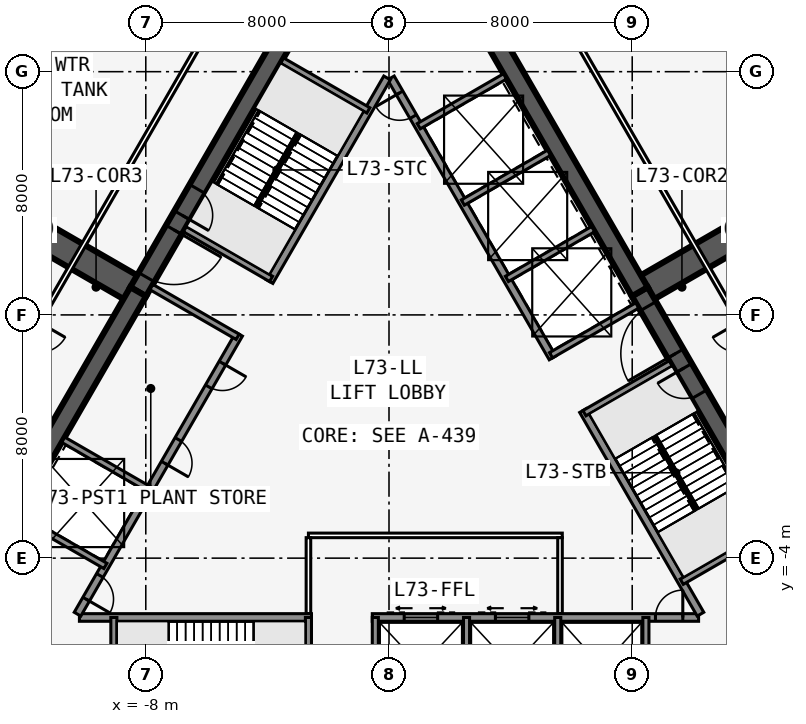
"""IFC4 building model, lengths in metres.
Left out: names, types, materials, properties, quantities, classifications, styles, units other than length and angle.
Written with IfcOpenShell. Run it as: python <this file> out.ifc"""

import sys

from ifc_helpers import new_model, si_unit, direction, frame, frame_2d, origin, place, context, subcontext, project, spatial, rectangle, extrude, element, fill, save


model = new_model("IFC4")
c1 = context("Model", 3, precision=1e-05, world=origin(), true_north=direction((0.0, 1.0)))
c2 = subcontext(c1, "Body", "Model", "MODEL_VIEW")
j1 = project(units=[si_unit("LENGTHUNIT", "METRE"), si_unit("PLANEANGLEUNIT", "RADIAN")], contexts=[c1])
p1 = place(None, origin())
s1 = spatial("IfcSite", under=j1, at=p1, CompositionType="ELEMENT")
p2 = place(p1, origin())
s2 = spatial("IfcBuilding", under=s1, at=p2, CompositionType="ELEMENT")
p3 = place(p2, frame((0.0, 0.0, 275.3)))
s3 = spatial("IfcBuildingStorey", under=s2, at=p3, CompositionType="ELEMENT", Elevation=275.3)
p4 = place(p3, frame((-10.183, -5.951, 0.0), z_axis=(0.0, 0.0, 1.0), x_axis=(1.0, 0.0, 0.0)))
e1 = element("IfcWall", 1, at=p4, inside=s3, PredefinedType="SOLIDWALL", context=c2, shape_type="SweptSolid", body=[
    extrude(rectangle(XDim=7.633, YDim=0.25, at=frame_2d((3.816, 0.0))), origin(), (0.0, 0.0, 1.0), 5.75),
])
p5 = place(p3, frame((-0.55, -5.951, 0.0), z_axis=(0.0, 0.0, 1.0), x_axis=(1.0, 0.0, 0.0)))
e2 = element("IfcWall", 2, at=p5, inside=s3, PredefinedType="SOLIDWALL", context=c2, shape_type="SweptSolid", body=[
    extrude(rectangle(XDim=10.733, YDim=0.25, at=frame_2d((5.366, 0.0))), origin(), (0.0, 0.0, 1.0), 5.75),
])
p6 = place(p5, frame((9.314, 0.0, 0.0)))
e3 = element("IfcOpeningElement", 3, at=p6, cuts=e2, PredefinedType="OPENING", context=c2, shape_type="SweptSolid", body=[
    extrude(rectangle(XDim=0.9, YDim=2.13, at=frame_2d((0.45, 1.065))), frame((0.0, 0.135, 0.0), z_axis=(0.0, -1.0, 0.0), x_axis=(1.0, 0.0, 0.0)), (0.0, 0.0, 1.0), 0.27),
])
p7 = place(p5, frame((1.05, 0.0, 0.0)))
e4 = element("IfcOpeningElement", 4, at=p7, cuts=e2, PredefinedType="OPENING", context=c2, shape_type="SweptSolid", body=[
    extrude(rectangle(XDim=1.1, YDim=2.13, at=frame_2d((0.55, 1.065))), frame((0.0, 0.135, 0.0), z_axis=(0.0, -1.0, 0.0), x_axis=(1.0, 0.0, 0.0)), (0.0, 0.0, 1.0), 0.27),
])
p8 = place(p5, frame((4.05, 0.0, 0.0)))
e5 = element("IfcOpeningElement", 5, at=p8, cuts=e2, PredefinedType="OPENING", context=c2, shape_type="SweptSolid", body=[
    extrude(rectangle(XDim=1.1, YDim=2.13, at=frame_2d((0.55, 1.065))), frame((0.0, 0.135, 0.0), z_axis=(0.0, -1.0, 0.0), x_axis=(1.0, 0.0, 0.0)), (0.0, 0.0, 1.0), 0.27),
])
p9 = place(p3, frame((-9.05, -5.951, 0.0), z_axis=(0.0, 0.0, 1.0), x_axis=(0.0, -1.0, 0.0)))
e6 = element("IfcWall", 6, at=p9, inside=s3, PredefinedType="SOLIDWALL", context=c2, shape_type="SweptSolid", body=[
    extrude(rectangle(XDim=3.275, YDim=0.2, at=frame_2d((1.637, 0.0))), origin(), (0.0, 0.0, 1.0), 5.75),
])
p10 = place(p3, frame((-2.65, -5.951, 0.0), z_axis=(0.0, 0.0, 1.0), x_axis=(0.0, -1.0, 0.0)))
e7 = element("IfcWall", 7, at=p10, inside=s3, PredefinedType="SOLIDWALL", context=c2, shape_type="SweptSolid", body=[
    extrude(rectangle(XDim=3.275, YDim=0.2, at=frame_2d((1.637, 0.0))), origin(), (0.0, 0.0, 1.0), 5.75),
])
p11 = place(p10, frame((1.675, 0.0, 0.0)))
e8 = element("IfcOpeningElement", 8, at=p11, cuts=e7, PredefinedType="OPENING", context=c2, shape_type="SweptSolid", body=[
    extrude(rectangle(XDim=1.0, YDim=2.13, at=frame_2d((0.5, 1.065))), frame((0.0, 0.11, 0.0), z_axis=(0.0, -1.0, 0.0), x_axis=(1.0, 0.0, 0.0)), (0.0, 0.0, 1.0), 0.22),
])
for number, where, z_axis, x_axis in (
    (9, (-0.45, -5.951, 0.0), (0.0, 0.0, 1.0), (0.0, -1.0, 0.0)),
    (10, (2.55, -5.951, 0.0), (0.0, 0.0, 1.0), (0.0, -1.0, 0.0)),
    (11, (5.55, -5.951, 0.0), (0.0, 0.0, 1.0), (0.0, -1.0, 0.0)),
    (12, (8.45, -5.951, 0.0), (0.0, 0.0, 1.0), (0.0, -1.0, 0.0)),
):
    element("IfcWall", number, at=place(p3, frame(where, z_axis=z_axis, x_axis=x_axis)), inside=s3, PredefinedType="SOLIDWALL", context=c2, shape_type="SweptSolid", body=[
        extrude(rectangle(XDim=3.275, YDim=0.2, at=frame_2d((1.637, 0.0))), origin(), (0.0, 0.0, 1.0), 5.75),
    ])
p12 = place(p3, frame((16.5, -9.526, 0.0), z_axis=(0.0, 0.0, 1.0), x_axis=(-0.499996545922, 0.866027397988, 0.0)))
e13 = element("IfcWall", 13, at=p12, inside=s3, PredefinedType="SHEAR", context=c2, shape_type="SweptSolid", body=[
    extrude(rectangle(XDim=16.5, YDim=0.6, at=frame_2d((8.25, 0.0))), origin(), (0.0, 0.0, 1.0), 6.0),
])
p13 = place(p12, frame((14.15, 0.0, 0.0)))
e14 = element("IfcOpeningElement", 14, at=p13, cuts=e13, PredefinedType="OPENING", context=c2, shape_type="SweptSolid", body=[
    extrude(rectangle(XDim=1.8, YDim=2.13, at=frame_2d((0.9, 1.065))), frame((0.0, 0.31, 0.0), z_axis=(0.0, -1.0, 0.0), x_axis=(1.0, 0.0, 0.0)), (0.0, 0.0, 1.0), 0.62),
])
p14 = place(p12, frame((12.6, 0.0, 0.0)))
e15 = element("IfcOpeningElement", 15, at=p14, cuts=e13, PredefinedType="OPENING", context=c2, shape_type="SweptSolid", body=[
    extrude(rectangle(XDim=1.0, YDim=2.13, at=frame_2d((0.5, 1.065))), frame((0.0, 0.31, 0.0), z_axis=(0.0, -1.0, 0.0), x_axis=(1.0, 0.0, 0.0)), (0.0, 0.0, 1.0), 0.62),
])
p15 = place(p3, frame((8.25, 4.763, 0.0), z_axis=(0.0, 0.0, 1.0), x_axis=(-0.500002952946, 0.866023698893, 0.0)))
e16 = element("IfcWall", 16, at=p15, inside=s3, PredefinedType="SHEAR", context=c2, shape_type="SweptSolid", body=[
    extrude(rectangle(XDim=16.5, YDim=0.6, at=frame_2d((8.25, 0.0))), origin(), (0.0, 0.0, 1.0), 6.0),
])
p16 = place(p3, frame((10.245, -5.843, 0.0), z_axis=(0.0, 0.0, 1.0), x_axis=(-0.499993009313, 0.866029439822, 0.0)))
e17 = element("IfcWall", 17, at=p16, inside=s3, PredefinedType="SOLIDWALL", context=c2, shape_type="SweptSolid", body=[
    extrude(rectangle(XDim=7.733, YDim=0.25, at=frame_2d((3.866, 0.0))), origin(), (0.0, 0.0, 1.0), 5.75),
])
p17 = place(p3, frame((5.379, 2.586, 0.0), z_axis=(0.0, 0.0, 1.0), x_axis=(-0.500001375892, 0.866024609411, 0.0)))
e18 = element("IfcWall", 18, at=p17, inside=s3, PredefinedType="SOLIDWALL", context=c2, shape_type="SweptSolid", body=[
    extrude(rectangle(XDim=10.633, YDim=0.25, at=frame_2d((5.316, 0.0))), origin(), (0.0, 0.0, 1.0), 5.75),
])
p18 = place(p17, frame((9.164, 0.0, 0.0)))
e19 = element("IfcOpeningElement", 19, at=p18, cuts=e18, PredefinedType="OPENING", context=c2, shape_type="SweptSolid", body=[
    extrude(rectangle(XDim=0.9, YDim=2.13, at=frame_2d((0.45, 1.065))), frame((0.0, 0.135, 0.0), z_axis=(0.0, -1.0, 0.0), x_axis=(1.0, 0.0, 0.0)), (0.0, 0.0, 1.0), 0.27),
])
p19 = place(p3, frame((9.629, -4.775, 0.0), z_axis=(0.0, 0.0, 1.0), x_axis=(0.865995643347, 0.500051543047, 0.0)))
e20 = element("IfcWall", 20, at=p19, inside=s3, PredefinedType="SOLIDWALL", context=c2, shape_type="SweptSolid", body=[
    extrude(rectangle(XDim=3.275, YDim=0.2, at=frame_2d((1.638, 0.0))), origin(), (0.0, 0.0, 1.0), 5.75),
])
for number, where, z_axis, x_axis in (
    (21, (6.429, 0.767, 0.0), (0.0, 0.0, 1.0), (0.866, 0.5, 0.0)),
    (22, (5.329, 2.673, 0.0), (0.0, 0.0, 1.0), (0.866, 0.5, 0.0)),
    (23, (3.879, 5.184, 0.0), (0.0, 0.0, 1.0), (0.866, 0.5, 0.0)),
    (24, (2.429, 7.696, 0.0), (0.0, 0.0, 1.0), (0.866, 0.5, 0.0)),
    (25, (0.979, 10.207, 0.0), (0.0, 0.0, 1.0), (0.866, 0.5, 0.0)),
):
    element("IfcWall", number, at=place(p3, frame(where, z_axis=z_axis, x_axis=x_axis)), inside=s3, PredefinedType="SOLIDWALL", context=c2, shape_type="SweptSolid", body=[
        extrude(rectangle(XDim=3.275, YDim=0.2, at=frame_2d((1.637, 0.0))), origin(), (0.0, 0.0, 1.0), 5.75),
    ])
p20 = place(p3, frame((0.0, 19.052, 0.0), z_axis=(0.0, 0.0, 1.0), x_axis=(-0.500002952946, -0.866023698893, 0.0)))
e26 = element("IfcWall", 26, at=p20, inside=s3, PredefinedType="SHEAR", context=c2, shape_type="SweptSolid", body=[
    extrude(rectangle(XDim=16.5, YDim=0.6, at=frame_2d((8.25, 0.0))), origin(), (0.0, 0.0, 1.0), 6.0),
])
p21 = place(p20, frame((14.15, 0.0, 0.0)))
e27 = element("IfcOpeningElement", 27, at=p21, cuts=e26, PredefinedType="OPENING", context=c2, shape_type="SweptSolid", body=[
    extrude(rectangle(XDim=1.8, YDim=2.13, at=frame_2d((0.9, 1.065))), frame((0.0, 0.31, 0.0), z_axis=(0.0, -1.0, 0.0), x_axis=(1.0, 0.0, 0.0)), (0.0, 0.0, 1.0), 0.62),
])
p22 = place(p20, frame((12.6, 0.0, 0.0)))
e28 = element("IfcOpeningElement", 28, at=p22, cuts=e26, PredefinedType="OPENING", context=c2, shape_type="SweptSolid", body=[
    extrude(rectangle(XDim=1.0, YDim=2.13, at=frame_2d((0.5, 1.065))), frame((0.0, 0.31, 0.0), z_axis=(0.0, -1.0, 0.0), x_axis=(1.0, 0.0, 0.0)), (0.0, 0.0, 1.0), 0.62),
])
p23 = place(p3, frame((-8.25, 4.763, 0.0), z_axis=(0.0, 0.0, 1.0), x_axis=(-0.499996545922, -0.866027397988, 0.0)))
e29 = element("IfcWall", 29, at=p23, inside=s3, PredefinedType="SHEAR", context=c2, shape_type="SweptSolid", body=[
    extrude(rectangle(XDim=16.5, YDim=0.6, at=frame_2d((8.25, 0.0))), origin(), (0.0, 0.0, 1.0), 6.0),
])
p24 = place(p3, frame((-0.062, 11.794, 0.0), z_axis=(0.0, 0.0, 1.0), x_axis=(-0.500006680225, -0.86602154692, 0.0)))
e30 = element("IfcWall", 30, at=p24, inside=s3, PredefinedType="SOLIDWALL", context=c2, shape_type="SweptSolid", body=[
    extrude(rectangle(XDim=7.733, YDim=0.25, at=frame_2d((3.866, 0.0))), origin(), (0.0, 0.0, 1.0), 5.75),
])
p25 = place(p3, frame((-4.929, 3.365, 0.0), z_axis=(0.0, 0.0, 1.0), x_axis=(-0.499991433582, -0.866030349552, 0.0)))
e31 = element("IfcWall", 31, at=p25, inside=s3, PredefinedType="SOLIDWALL", context=c2, shape_type="SweptSolid", body=[
    extrude(rectangle(XDim=10.633, YDim=0.25, at=frame_2d((5.316, 0.0))), origin(), (0.0, 0.0, 1.0), 5.75),
])
p26 = place(p25, frame((9.164, 0.0, 0.0)))
e32 = element("IfcOpeningElement", 32, at=p26, cuts=e31, PredefinedType="OPENING", context=c2, shape_type="SweptSolid", body=[
    extrude(rectangle(XDim=0.9, YDim=2.13, at=frame_2d((0.45, 1.065))), frame((0.0, 0.135, 0.0), z_axis=(0.0, -1.0, 0.0), x_axis=(1.0, 0.0, 0.0)), (0.0, 0.0, 1.0), 0.27),
])
p27 = place(p25, frame((1.1, 0.0, 0.0)))
e33 = element("IfcOpeningElement", 33, at=p27, cuts=e31, PredefinedType="OPENING", context=c2, shape_type="SweptSolid", body=[
    extrude(rectangle(XDim=0.9, YDim=2.13, at=frame_2d((0.45, 1.065))), frame((0.0, 0.135, 0.0), z_axis=(0.0, -1.0, 0.0), x_axis=(1.0, 0.0, 0.0)), (0.0, 0.0, 1.0), 0.27),
])
p28 = place(p25, frame((4.0, 0.0, 0.0)))
e34 = element("IfcOpeningElement", 34, at=p28, cuts=e31, PredefinedType="OPENING", context=c2, shape_type="SweptSolid", body=[
    extrude(rectangle(XDim=0.9, YDim=2.13, at=frame_2d((0.45, 1.065))), frame((0.0, 0.135, 0.0), z_axis=(0.0, -1.0, 0.0), x_axis=(1.0, 0.0, 0.0)), (0.0, 0.0, 1.0), 0.27),
])
for number, where, z_axis, x_axis in (
    (35, (-0.679, 10.727, 0.0), (0.0, 0.0, 1.0), (-0.866, 0.5, 0.0)),
    (36, (-3.879, 5.184, 0.0), (0.0, 0.0, 1.0), (-0.866, 0.5, 0.0)),
    (37, (-4.979, 3.279, 0.0), (0.0, 0.0, 1.0), (-0.866, 0.5, 0.0)),
    (38, (-7.879, -1.744, 0.0), (0.0, 0.0, 1.0), (-0.866, 0.5, 0.0)),
    (39, (-9.329, -4.256, 0.0), (0.0, 0.0, 1.0), (-0.866, 0.5, 0.0)),
):
    element("IfcWall", number, at=place(p3, frame(where, z_axis=z_axis, x_axis=x_axis)), inside=s3, PredefinedType="SOLIDWALL", context=c2, shape_type="SweptSolid", body=[
        extrude(rectangle(XDim=3.275, YDim=0.2, at=frame_2d((1.637, 0.0))), origin(), (0.0, 0.0, 1.0), 5.75),
    ])
for number, where, z_axis, x_axis in (
    (40, (8.25, 4.763, 0.0), (0.0, 0.0, 1.0), (0.866, 0.5, 0.0)),
    (41, (-8.25, 4.763, 0.0), (0.0, 0.0, 1.0), (-0.866, 0.5, 0.0)),
):
    element("IfcWall", number, at=place(p3, frame(where, z_axis=z_axis, x_axis=x_axis)), inside=s3, PredefinedType="SHEAR", context=c2, shape_type="SweptSolid", body=[
        extrude(rectangle(XDim=8.154, YDim=0.9, at=frame_2d((4.077, 0.0))), origin(), (0.0, 0.0, 1.0), 6.0),
    ])
p29 = place(p3, frame((20.177, -11.245, 0.0), z_axis=(0.0, 0.0, 1.0), x_axis=(-0.499998875317, 0.866026053119, 0.0)))
e42 = element("IfcWall", 42, at=p29, inside=s3, PredefinedType="PARTITIONING", context=c2, shape_type="SweptSolid", body=[
    extrude(rectangle(XDim=39.654, YDim=0.15, at=frame_2d((19.827, 0.0))), origin(), (0.0, 0.0, 1.0), 5.75),
])
p30 = place(p29, frame((6.563, 0.0, 0.0)))
e43 = element("IfcOpeningElement", 43, at=p30, cuts=e42, PredefinedType="OPENING", context=c2, shape_type="SweptSolid", body=[
    extrude(rectangle(XDim=1.0, YDim=2.13, at=frame_2d((0.5, 1.065))), frame((0.0, 0.085, 0.0), z_axis=(0.0, -1.0, 0.0), x_axis=(1.0, 0.0, 0.0)), (0.0, 0.0, 1.0), 0.17),
])
p31 = place(p29, frame((16.327, 0.0, 0.0)))
e44 = element("IfcOpeningElement", 44, at=p31, cuts=e42, PredefinedType="OPENING", context=c2, shape_type="SweptSolid", body=[
    extrude(rectangle(XDim=1.0, YDim=2.13, at=frame_2d((0.5, 1.065))), frame((0.0, 0.085, 0.0), z_axis=(0.0, -1.0, 0.0), x_axis=(1.0, 0.0, 0.0)), (0.0, 0.0, 1.0), 0.17),
])
p32 = place(p29, frame((29.091, 0.0, 0.0)))
e45 = element("IfcOpeningElement", 45, at=p32, cuts=e42, PredefinedType="OPENING", context=c2, shape_type="SweptSolid", body=[
    extrude(rectangle(XDim=1.0, YDim=2.13, at=frame_2d((0.5, 1.065))), frame((0.0, 0.085, 0.0), z_axis=(0.0, -1.0, 0.0), x_axis=(1.0, 0.0, 0.0)), (0.0, 0.0, 1.0), 0.17),
])
p33 = place(p3, frame((-0.35, 23.096, 0.0), z_axis=(0.0, 0.0, 1.0), x_axis=(-0.499998875317, -0.866026053119, 0.0)))
e46 = element("IfcWall", 46, at=p33, inside=s3, PredefinedType="PARTITIONING", context=c2, shape_type="SweptSolid", body=[
    extrude(rectangle(XDim=39.654, YDim=0.15, at=frame_2d((19.827, 0.0))), origin(), (0.0, 0.0, 1.0), 5.75),
])
p34 = place(p33, frame((9.563, 0.0, 0.0)))
e47 = element("IfcOpeningElement", 47, at=p34, cuts=e46, PredefinedType="OPENING", context=c2, shape_type="SweptSolid", body=[
    extrude(rectangle(XDim=1.0, YDim=2.13, at=frame_2d((0.5, 1.065))), frame((0.0, 0.085, 0.0), z_axis=(0.0, -1.0, 0.0), x_axis=(1.0, 0.0, 0.0)), (0.0, 0.0, 1.0), 0.17),
])
p35 = place(p33, frame((22.327, 0.0, 0.0)))
e48 = element("IfcOpeningElement", 48, at=p35, cuts=e46, PredefinedType="OPENING", context=c2, shape_type="SweptSolid", body=[
    extrude(rectangle(XDim=1.0, YDim=2.13, at=frame_2d((0.5, 1.065))), frame((0.0, 0.085, 0.0), z_axis=(0.0, -1.0, 0.0), x_axis=(1.0, 0.0, 0.0)), (0.0, 0.0, 1.0), 0.17),
])
p36 = place(p33, frame((32.091, 0.0, 0.0)))
e49 = element("IfcOpeningElement", 49, at=p36, cuts=e46, PredefinedType="OPENING", context=c2, shape_type="SweptSolid", body=[
    extrude(rectangle(XDim=1.0, YDim=2.13, at=frame_2d((0.5, 1.065))), frame((0.0, 0.085, 0.0), z_axis=(0.0, -1.0, 0.0), x_axis=(1.0, 0.0, 0.0)), (0.0, 0.0, 1.0), 0.17),
])
p37 = place(p3, frame((-2.65, -3.251, 0.0), z_axis=(0.0, 0.0, 1.0), x_axis=(1.0, 0.0, 0.0)))
e50 = element("IfcWall", 50, at=p37, inside=s3, PredefinedType="PARTITIONING", context=c2, shape_type="SweptSolid", body=[
    extrude(rectangle(XDim=8.35, YDim=0.15, at=frame_2d((4.175, 0.0))), origin(), (0.0, 0.0, 1.0), 5.75),
])
for number, where, z_axis, x_axis in (
    (51, (-2.65, -5.826, 0.0), (0.0, 0.0, 1.0), (0.0, 1.0, 0.0)),
    (52, (5.625, -5.826, 0.0), (0.0, 0.0, 1.0), (0.0, 1.0, 0.0)),
):
    element("IfcWall", number, at=place(p3, frame(where, z_axis=z_axis, x_axis=x_axis)), inside=s3, PredefinedType="PARTITIONING", context=c2, shape_type="SweptSolid", body=[
        extrude(rectangle(XDim=2.5, YDim=0.15, at=frame_2d((1.25, 0.0))), origin(), (0.0, 0.0, 1.0), 5.75),
    ])
for number, where, z_axis, x_axis in (
    (53, (10.135, -2.401, 0.0), (0.0, 0.0, 1.0), (-0.5, 0.866, 0.0)),
    (54, (-2.988, 9.978, 0.0), (0.0, 0.0, 1.0), (-0.5, -0.866, 0.0)),
):
    element("IfcWall", number, at=place(p3, frame(where, z_axis=z_axis, x_axis=x_axis)), inside=s3, PredefinedType="SOLIDWALL", context=c2, shape_type="SweptSolid", body=[
        extrude(rectangle(XDim=2.794, YDim=0.1, at=frame_2d((1.397, 0.0))), origin(), (0.0, 0.0, 1.0), 6.0),
    ])
p38 = place(p13, origin())
e55 = element("IfcDoor", 55, at=p38, inside=s3, OperationType="DOUBLE_DOOR_SINGLE_SWING", PredefinedType="DOOR", context=c2, shape_type="SweptSolid", body=[
    extrude(rectangle(XDim=1.8, YDim=2.13, at=frame_2d((0.9, 1.065))), frame((0.0, 0.025, 0.0), z_axis=(0.0, -1.0, 0.0), x_axis=(1.0, 0.0, 0.0)), (0.0, 0.0, 1.0), 0.05),
])
fill(e14, e55)
p39 = place(p14, origin())
e56 = element("IfcDoor", 56, at=p39, inside=s3, OperationType="SINGLE_SWING_RIGHT", PredefinedType="DOOR", context=c2, shape_type="SweptSolid", body=[
    extrude(rectangle(XDim=1.0, YDim=2.13, at=frame_2d((0.5, 1.065))), frame((0.0, 0.025, 0.0), z_axis=(0.0, -1.0, 0.0), x_axis=(1.0, 0.0, 0.0)), (0.0, 0.0, 1.0), 0.05),
])
fill(e15, e56)
p40 = place(p21, origin())
e57 = element("IfcDoor", 57, at=p40, inside=s3, OperationType="DOUBLE_DOOR_SINGLE_SWING", PredefinedType="DOOR", context=c2, shape_type="SweptSolid", body=[
    extrude(rectangle(XDim=1.8, YDim=2.13, at=frame_2d((0.9, 1.065))), frame((0.0, 0.025, 0.0), z_axis=(0.0, -1.0, 0.0), x_axis=(1.0, 0.0, 0.0)), (0.0, 0.0, 1.0), 0.05),
])
fill(e27, e57)
p41 = place(p22, origin())
e58 = element("IfcDoor", 58, at=p41, inside=s3, OperationType="SINGLE_SWING_RIGHT", PredefinedType="DOOR", context=c2, shape_type="SweptSolid", body=[
    extrude(rectangle(XDim=1.0, YDim=2.13, at=frame_2d((0.5, 1.065))), frame((0.0, 0.025, 0.0), z_axis=(0.0, -1.0, 0.0), x_axis=(1.0, 0.0, 0.0)), (0.0, 0.0, 1.0), 0.05),
])
fill(e28, e58)
p42 = place(p6, origin())
e59 = element("IfcDoor", 59, at=p42, inside=s3, OperationType="SINGLE_SWING_RIGHT", PredefinedType="DOOR", context=c2, shape_type="SweptSolid", body=[
    extrude(rectangle(XDim=0.9, YDim=2.13, at=frame_2d((0.45, 1.065))), frame((0.0, 0.025, 0.0), z_axis=(0.0, -1.0, 0.0), x_axis=(1.0, 0.0, 0.0)), (0.0, 0.0, 1.0), 0.05),
])
fill(e3, e59)
p43 = place(p18, origin())
e60 = element("IfcDoor", 60, at=p43, inside=s3, OperationType="SINGLE_SWING_RIGHT", PredefinedType="DOOR", context=c2, shape_type="SweptSolid", body=[
    extrude(rectangle(XDim=0.9, YDim=2.13, at=frame_2d((0.45, 1.065))), frame((0.0, 0.025, 0.0), z_axis=(0.0, -1.0, 0.0), x_axis=(1.0, 0.0, 0.0)), (0.0, 0.0, 1.0), 0.05),
])
fill(e19, e60)
p44 = place(p26, origin())
e61 = element("IfcDoor", 61, at=p44, inside=s3, OperationType="SINGLE_SWING_RIGHT", PredefinedType="DOOR", context=c2, shape_type="SweptSolid", body=[
    extrude(rectangle(XDim=0.9, YDim=2.13, at=frame_2d((0.45, 1.065))), frame((0.0, 0.025, 0.0), z_axis=(0.0, -1.0, 0.0), x_axis=(1.0, 0.0, 0.0)), (0.0, 0.0, 1.0), 0.05),
])
fill(e32, e61)
p45 = place(p27, origin())
e62 = element("IfcDoor", 62, at=p45, inside=s3, OperationType="SINGLE_SWING_LEFT", PredefinedType="DOOR", context=c2, shape_type="SweptSolid", body=[
    extrude(rectangle(XDim=0.9, YDim=2.13, at=frame_2d((0.45, 1.065))), frame((0.0, 0.025, 0.0), z_axis=(0.0, -1.0, 0.0), x_axis=(1.0, 0.0, 0.0)), (0.0, 0.0, 1.0), 0.05),
])
fill(e33, e62)
p46 = place(p28, origin())
e63 = element("IfcDoor", 63, at=p46, inside=s3, OperationType="SINGLE_SWING_RIGHT", PredefinedType="DOOR", context=c2, shape_type="SweptSolid", body=[
    extrude(rectangle(XDim=0.9, YDim=2.13, at=frame_2d((0.45, 1.065))), frame((0.0, 0.025, 0.0), z_axis=(0.0, -1.0, 0.0), x_axis=(1.0, 0.0, 0.0)), (0.0, 0.0, 1.0), 0.05),
])
fill(e34, e63)
p47 = place(p7, origin())
e64 = element("IfcDoor", 64, at=p47, inside=s3, OperationType="DOUBLE_DOOR_SLIDING", PredefinedType="USERDEFINED", context=c2, shape_type="SweptSolid", body=[
    extrude(rectangle(XDim=1.1, YDim=2.13, at=frame_2d((0.55, 1.065))), frame((0.0, 0.025, 0.0), z_axis=(0.0, -1.0, 0.0), x_axis=(1.0, 0.0, 0.0)), (0.0, 0.0, 1.0), 0.05),
])
fill(e4, e64)
p48 = place(p8, origin())
e65 = element("IfcDoor", 65, at=p48, inside=s3, OperationType="DOUBLE_DOOR_SLIDING", PredefinedType="USERDEFINED", context=c2, shape_type="SweptSolid", body=[
    extrude(rectangle(XDim=1.1, YDim=2.13, at=frame_2d((0.55, 1.065))), frame((0.0, 0.025, 0.0), z_axis=(0.0, -1.0, 0.0), x_axis=(1.0, 0.0, 0.0)), (0.0, 0.0, 1.0), 0.05),
])
fill(e5, e65)
save(model, sys.argv[1])
